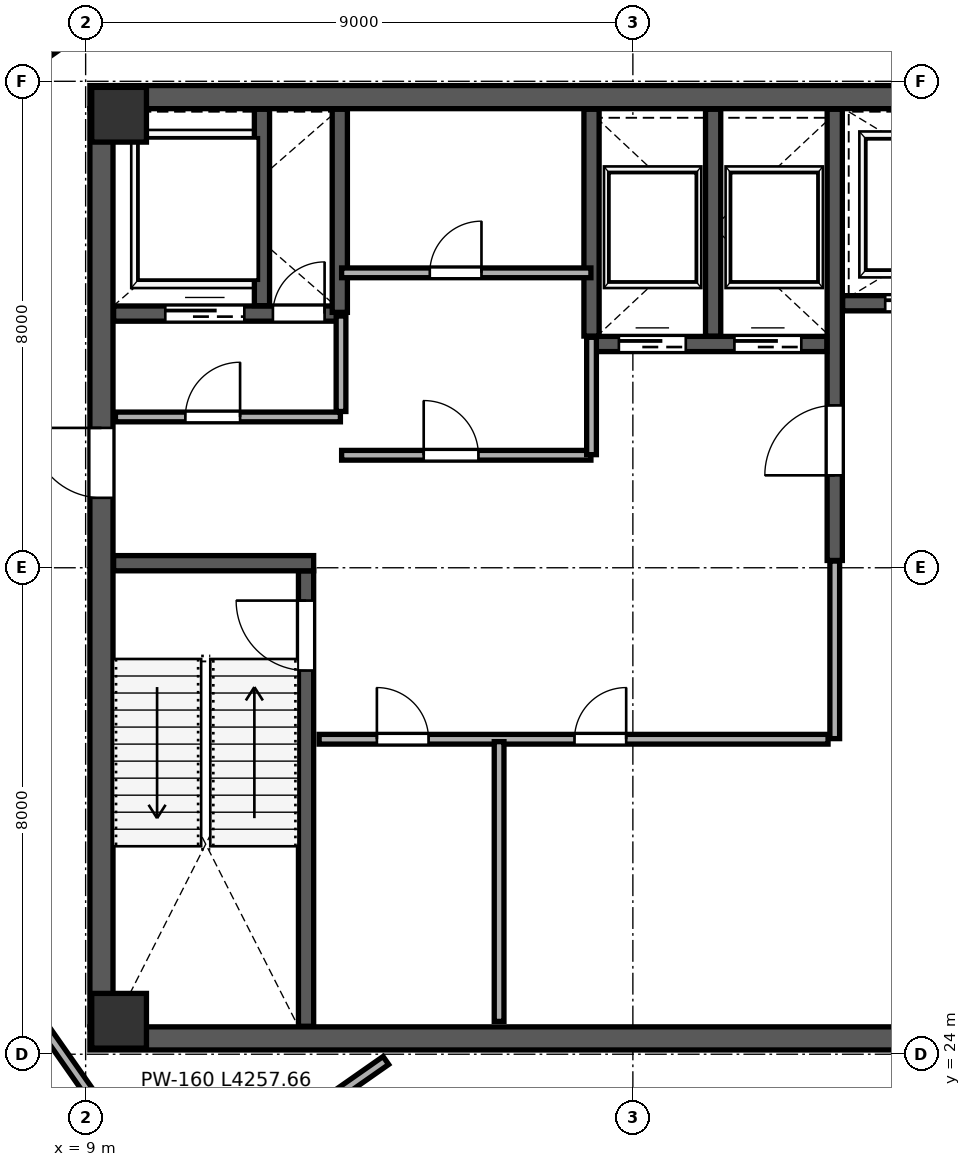
"""IFC4 building model, lengths in metres.
Left out: names, types, materials, properties, quantities, classifications, styles, units other than length and angle.
Written with IfcOpenShell. Run it as: python <this file> out.ifc"""

import sys

from ifc_helpers import new_model, si_unit, direction, frame, frame_2d, origin, origin_2d, place, context, subcontext, project, spatial, rectangle, extrude, source, transform, mapped, element, fill, save


model = new_model("IFC4")
c1 = context("Model", 3, precision=1e-05, world=origin(), true_north=direction((0.0, 1.0)))
c2 = subcontext(c1, "Body", "Model", "MODEL_VIEW")
j1 = project(units=[si_unit("LENGTHUNIT", "METRE"), si_unit("PLANEANGLEUNIT", "RADIAN")], contexts=[c1])
p1 = place(None, origin())
s1 = spatial("IfcSite", under=j1, at=p1, CompositionType="ELEMENT")
p2 = place(p1, origin())
s2 = spatial("IfcBuilding", under=s1, at=p2, CompositionType="ELEMENT")
p3 = place(p2, frame((0.0, 0.0, 303.0)))
s3 = spatial("IfcBuildingStorey", under=s2, at=p3, CompositionType="ELEMENT", Elevation=303.0)
m1 = source(origin(), c2, "Body", "SweptSolid", [
    extrude(rectangle(XDim=0.9, YDim=0.9, at=origin_2d()), origin(), (0.0, 0.0, 1.0), 4.198),
])
for number, where, z_axis, x_axis in (
    (1, (9.55, 24.55, 0.001), (0.0, 0.0, 1.0), (1.0, 0.0, 0.0)),
    (2, (9.55, 39.45, 0.001), (0.0, 0.0, 1.0), (1.0, 0.0, 0.0)),
):
    element("IfcColumn", number, at=place(p3, frame(where, z_axis=z_axis, x_axis=x_axis)), inside=s3, PredefinedType="COLUMN", context=c2, shape_type="MappedRepresentation", body=[
        mapped(m1, transform((0.0, 0.0, 0.0), scale=1.0)),
    ])
p4 = place(p3, frame((9.26, 24.45, 0.0), z_axis=(0.0, 0.0, 1.0), x_axis=(0.0, 1.0, 0.0)))
e3 = element("IfcWall", 3, at=p4, inside=s3, PredefinedType="SHEAR", context=c2, shape_type="SweptSolid", body=[
    extrude(rectangle(XDim=15.1, YDim=0.38, at=frame_2d((7.55, 0.0))), origin(), (0.0, 0.0, 1.0), 3.96),
])
p5 = place(p4, frame((8.7, 0.0, 0.0)))
e4 = element("IfcOpeningElement", 4, at=p5, cuts=e3, PredefinedType="OPENING", context=c2, shape_type="SweptSolid", body=[
    extrude(rectangle(XDim=1.15, YDim=2.2, at=frame_2d((0.575, 1.1))), frame((0.0, 0.2, 0.0), z_axis=(0.0, -1.0, 0.0), x_axis=(1.0, 0.0, 0.0)), (0.0, 0.0, 1.0), 0.4),
])
for number, where, z_axis, x_axis in (
    (5, (9.07, 24.26, 0.0), (0.0, 0.0, 1.0), (1.0, 0.0, 0.0)),
    (6, (9.07, 39.74, 0.0), (0.0, 0.0, 1.0), (1.0, 0.0, 0.0)),
):
    element("IfcWall", number, at=place(p3, frame(where, z_axis=z_axis, x_axis=x_axis)), inside=s3, PredefinedType="SHEAR", context=c2, shape_type="SweptSolid", body=[
        extrude(rectangle(XDim=17.86, YDim=0.38, at=frame_2d((8.93, 0.0))), origin(), (0.0, 0.0, 1.0), 3.96),
    ])
p6 = place(p3, frame((12.625, 24.46, 0.0), z_axis=(0.0, 0.0, 1.0), x_axis=(0.0, 1.0, 0.0)))
e7 = element("IfcWall", 7, at=p6, inside=s3, PredefinedType="SHEAR", context=c2, shape_type="SweptSolid", body=[
    extrude(rectangle(XDim=7.49, YDim=0.25, at=frame_2d((3.745, 0.0))), origin(), (0.0, 0.0, 1.0), 3.96),
])
p7 = place(p6, frame((5.85, 0.0, 0.0)))
e8 = element("IfcOpeningElement", 8, at=p7, cuts=e7, PredefinedType="OPENING", context=c2, shape_type="SweptSolid", body=[
    extrude(rectangle(XDim=1.15, YDim=2.2, at=frame_2d((0.575, 1.1))), frame((0.0, 0.135, 0.0), z_axis=(0.0, -1.0, 0.0), x_axis=(1.0, 0.0, 0.0)), (0.0, 0.0, 1.0), 0.27),
])
p8 = place(p3, frame((9.46, 32.075, 0.0), z_axis=(0.0, 0.0, 1.0), x_axis=(1.0, 0.0, 0.0)))
e9 = element("IfcWall", 9, at=p8, inside=s3, PredefinedType="SHEAR", context=c2, shape_type="SweptSolid", body=[
    extrude(rectangle(XDim=3.29, YDim=0.25, at=frame_2d((1.645, 0.0))), origin(), (0.0, 0.0, 1.0), 3.96),
])
p9 = place(p3, frame((21.32, 32.12, 0.0), z_axis=(0.0, 0.0, 1.0), x_axis=(0.0, 1.0, 0.0)))
e10 = element("IfcWall", 10, at=p9, inside=s3, PredefinedType="SHEAR", context=c2, shape_type="SweptSolid", body=[
    extrude(rectangle(XDim=7.42, YDim=0.25, at=frame_2d((3.71, 0.0))), origin(), (0.0, 0.0, 1.0), 3.96),
])
p10 = place(p9, frame((1.4, 0.0, 0.0)))
e11 = element("IfcOpeningElement", 11, at=p10, cuts=e10, PredefinedType="OPENING", context=c2, shape_type="SweptSolid", body=[
    extrude(rectangle(XDim=1.15, YDim=2.2, at=frame_2d((0.575, 1.1))), frame((0.0, 0.135, 0.0), z_axis=(0.0, -1.0, 0.0), x_axis=(1.0, 0.0, 0.0)), (0.0, 0.0, 1.0), 0.27),
])
p11 = place(p3, frame((9.46, 36.18, 0.0), z_axis=(0.0, 0.0, 1.0), x_axis=(1.0, 0.0, 0.0)))
e12 = element("IfcWall", 12, at=p11, inside=s3, PredefinedType="SHEAR", context=c2, shape_type="SweptSolid", body=[
    extrude(rectangle(XDim=3.79, YDim=0.25, at=frame_2d((1.895, 0.0))), origin(), (0.0, 0.0, 1.0), 3.96),
])
p12 = place(p11, frame((2.62, 0.0, 0.0)))
e13 = element("IfcOpeningElement", 13, at=p12, cuts=e12, PredefinedType="OPENING", context=c2, shape_type="SweptSolid", body=[
    extrude(rectangle(XDim=0.85, YDim=2.1, at=frame_2d((0.425, 1.05))), frame((0.0, 0.135, 0.0), z_axis=(0.0, -1.0, 0.0), x_axis=(1.0, 0.0, 0.0)), (0.0, 0.0, 1.0), 0.27),
])
p13 = place(p11, frame((0.85, 0.0, 0.0)))
e14 = element("IfcOpeningElement", 14, at=p13, cuts=e12, PredefinedType="OPENING", context=c2, shape_type="SweptSolid", body=[
    extrude(rectangle(XDim=1.3, YDim=2.25, at=frame_2d((0.65, 1.125))), frame((0.0, 0.135, 0.0), z_axis=(0.0, -1.0, 0.0), x_axis=(1.0, 0.0, 0.0)), (0.0, 0.0, 1.0), 0.27),
])
p14 = place(p3, frame((11.9, 36.31, 0.0), z_axis=(0.0, 0.0, 1.0), x_axis=(0.0, 1.0, 0.0)))
e15 = element("IfcWall", 15, at=p14, inside=s3, PredefinedType="SHEAR", context=c2, shape_type="SweptSolid", body=[
    extrude(rectangle(XDim=3.23, YDim=0.25, at=frame_2d((1.615, 0.0))), origin(), (0.0, 0.0, 1.0), 3.96),
])
p15 = place(p3, frame((21.45, 36.35, 0.0), z_axis=(0.0, 0.0, 1.0), x_axis=(1.0, 0.0, 0.0)))
e16 = element("IfcWall", 16, at=p15, inside=s3, PredefinedType="SHEAR", context=c2, shape_type="SweptSolid", body=[
    extrude(rectangle(XDim=5.09, YDim=0.25, at=frame_2d((2.545, 0.0))), origin(), (0.0, 0.0, 1.0), 3.96),
])
p16 = place(p15, frame((0.7, 0.0, 0.0)))
e17 = element("IfcOpeningElement", 17, at=p16, cuts=e16, PredefinedType="OPENING", context=c2, shape_type="SweptSolid", body=[
    extrude(rectangle(XDim=1.2, YDim=2.2, at=frame_2d((0.6, 1.1))), frame((0.0, 0.135, 0.0), z_axis=(0.0, -1.0, 0.0), x_axis=(1.0, 0.0, 0.0)), (0.0, 0.0, 1.0), 0.27),
])
p17 = place(p15, frame((3.25, 0.0, 0.0)))
e18 = element("IfcOpeningElement", 18, at=p17, cuts=e16, PredefinedType="OPENING", context=c2, shape_type="SweptSolid", body=[
    extrude(rectangle(XDim=1.2, YDim=2.2, at=frame_2d((0.6, 1.1))), frame((0.0, 0.135, 0.0), z_axis=(0.0, -1.0, 0.0), x_axis=(1.0, 0.0, 0.0)), (0.0, 0.0, 1.0), 0.27),
])
p18 = place(p3, frame((13.18, 36.2, 0.0), z_axis=(0.0, 0.0, 1.0), x_axis=(0.0, 1.0, 0.0)))
e19 = element("IfcWall", 19, at=p18, inside=s3, PredefinedType="SHEAR", context=c2, shape_type="SweptSolid", body=[
    extrude(rectangle(XDim=3.34, YDim=0.25, at=frame_2d((1.67, 0.0))), origin(), (0.0, 0.0, 1.0), 3.96),
])
p19 = place(p3, frame((17.32, 35.68, 0.0), z_axis=(0.0, 0.0, 1.0), x_axis=(1.0, 0.0, 0.0)))
e20 = element("IfcWall", 20, at=p19, inside=s3, PredefinedType="SHEAR", context=c2, shape_type="SweptSolid", body=[
    extrude(rectangle(XDim=3.87, YDim=0.25, at=frame_2d((1.935, 0.0))), origin(), (0.0, 0.0, 1.0), 3.96),
])
p20 = place(p19, frame((0.45, 0.0, 0.0)))
e21 = element("IfcOpeningElement", 21, at=p20, cuts=e20, PredefinedType="OPENING", context=c2, shape_type="SweptSolid", body=[
    extrude(rectangle(XDim=1.1, YDim=2.2, at=frame_2d((0.55, 1.1))), frame((0.0, 0.135, 0.0), z_axis=(0.0, -1.0, 0.0), x_axis=(1.0, 0.0, 0.0)), (0.0, 0.0, 1.0), 0.27),
])
p21 = place(p19, frame((2.35, 0.0, 0.0)))
e22 = element("IfcOpeningElement", 22, at=p21, cuts=e20, PredefinedType="OPENING", context=c2, shape_type="SweptSolid", body=[
    extrude(rectangle(XDim=1.1, YDim=2.2, at=frame_2d((0.55, 1.1))), frame((0.0, 0.135, 0.0), z_axis=(0.0, -1.0, 0.0), x_axis=(1.0, 0.0, 0.0)), (0.0, 0.0, 1.0), 0.27),
])
for number, where, z_axis, x_axis in (
    (23, (17.32, 35.81, 0.0), (0.0, 0.0, 1.0), (0.0, 1.0, 0.0)),
    (24, (19.32, 35.81, 0.0), (0.0, 0.0, 1.0), (0.0, 1.0, 0.0)),
):
    element("IfcWall", number, at=place(p3, frame(where, z_axis=z_axis, x_axis=x_axis)), inside=s3, PredefinedType="SHEAR", context=c2, shape_type="SweptSolid", body=[
        extrude(rectangle(XDim=3.73, YDim=0.25, at=frame_2d((1.865, 0.0))), origin(), (0.0, 0.0, 1.0), 3.96),
    ])
p22 = place(p3, frame((9.49, 34.48, 0.0), z_axis=(0.0, 0.0, 1.0), x_axis=(1.0, 0.0, 0.0)))
e25 = element("IfcWall", 25, at=p22, inside=s3, PredefinedType="PARTITIONING", context=c2, shape_type="SweptSolid", body=[
    extrude(rectangle(XDim=3.7, YDim=0.16, at=frame_2d((1.85, 0.0))), origin(), (0.0, 0.0, 1.0), 3.96),
])
p23 = place(p22, frame((1.15, 0.0, 0.0)))
e26 = element("IfcOpeningElement", 26, at=p23, cuts=e25, PredefinedType="OPENING", context=c2, shape_type="SweptSolid", body=[
    extrude(rectangle(XDim=0.9, YDim=2.15, at=frame_2d((0.45, 1.075))), frame((0.0, 0.09, 0.0), z_axis=(0.0, -1.0, 0.0), x_axis=(1.0, 0.0, 0.0)), (0.0, 0.0, 1.0), 0.18),
])
p24 = place(p3, frame((13.2, 34.57, 0.0), z_axis=(0.0, 0.0, 1.0), x_axis=(0.0, 1.0, 0.0)))
e27 = element("IfcWall", 27, at=p24, inside=s3, PredefinedType="PARTITIONING", context=c2, shape_type="SweptSolid", body=[
    extrude(rectangle(XDim=1.57, YDim=0.16, at=frame_2d((0.785, 0.0))), origin(), (0.0, 0.0, 1.0), 3.96),
])
p25 = place(p3, frame((13.21, 33.85, 0.0), z_axis=(0.0, 0.0, 1.0), x_axis=(1.0, 0.0, 0.0)))
e28 = element("IfcWall", 28, at=p25, inside=s3, PredefinedType="PARTITIONING", context=c2, shape_type="SweptSolid", body=[
    extrude(rectangle(XDim=4.1, YDim=0.16, at=frame_2d((2.05, 0.0))), origin(), (0.0, 0.0, 1.0), 3.96),
])
p26 = place(p25, frame((1.35, 0.0, 0.0)))
e29 = element("IfcOpeningElement", 29, at=p26, cuts=e28, PredefinedType="OPENING", context=c2, shape_type="SweptSolid", body=[
    extrude(rectangle(XDim=0.9, YDim=2.15, at=frame_2d((0.45, 1.075))), frame((0.0, 0.09, 0.0), z_axis=(0.0, -1.0, 0.0), x_axis=(1.0, 0.0, 0.0)), (0.0, 0.0, 1.0), 0.18),
])
p27 = place(p3, frame((17.32, 33.86, 0.0), z_axis=(0.0, 0.0, 1.0), x_axis=(0.0, 1.0, 0.0)))
e30 = element("IfcWall", 30, at=p27, inside=s3, PredefinedType="PARTITIONING", context=c2, shape_type="SweptSolid", body=[
    extrude(rectangle(XDim=1.93, YDim=0.16, at=frame_2d((0.965, 0.0))), origin(), (0.0, 0.0, 1.0), 3.96),
])
p28 = place(p3, frame((13.21, 36.85, 0.0), z_axis=(0.0, 0.0, 1.0), x_axis=(1.0, 0.0, 0.0)))
e31 = element("IfcWall", 31, at=p28, inside=s3, PredefinedType="PARTITIONING", context=c2, shape_type="SweptSolid", body=[
    extrude(rectangle(XDim=4.1, YDim=0.16, at=frame_2d((2.05, 0.0))), origin(), (0.0, 0.0, 1.0), 3.96),
])
p29 = place(p28, frame((1.45, 0.0, 0.0)))
e32 = element("IfcOpeningElement", 32, at=p29, cuts=e31, PredefinedType="OPENING", context=c2, shape_type="SweptSolid", body=[
    extrude(rectangle(XDim=0.85, YDim=2.1, at=frame_2d((0.425, 1.05))), frame((0.0, 0.09, 0.0), z_axis=(0.0, -1.0, 0.0), x_axis=(1.0, 0.0, 0.0)), (0.0, 0.0, 1.0), 0.18),
])
p30 = place(p3, frame((12.84, 29.18, 0.0), z_axis=(0.0, 0.0, 1.0), x_axis=(1.0, 0.0, 0.0)))
e33 = element("IfcWall", 33, at=p30, inside=s3, PredefinedType="PARTITIONING", context=c2, shape_type="SweptSolid", body=[
    extrude(rectangle(XDim=8.37, YDim=0.16, at=frame_2d((4.185, 0.0))), origin(), (0.0, 0.0, 1.0), 3.96),
])
p31 = place(p30, frame((0.95, 0.0, 0.0)))
e34 = element("IfcOpeningElement", 34, at=p31, cuts=e33, PredefinedType="OPENING", context=c2, shape_type="SweptSolid", body=[
    extrude(rectangle(XDim=0.85, YDim=2.1, at=frame_2d((0.425, 1.05))), frame((0.0, 0.09, 0.0), z_axis=(0.0, -1.0, 0.0), x_axis=(1.0, 0.0, 0.0)), (0.0, 0.0, 1.0), 0.18),
])
p32 = place(p30, frame((4.2, 0.0, 0.0)))
e35 = element("IfcOpeningElement", 35, at=p32, cuts=e33, PredefinedType="OPENING", context=c2, shape_type="SweptSolid", body=[
    extrude(rectangle(XDim=0.85, YDim=2.1, at=frame_2d((0.425, 1.05))), frame((0.0, 0.09, 0.0), z_axis=(0.0, -1.0, 0.0), x_axis=(1.0, 0.0, 0.0)), (0.0, 0.0, 1.0), 0.18),
])
p33 = place(p3, frame((15.8, 24.54, 0.0), z_axis=(0.0, 0.0, 1.0), x_axis=(0.0, 1.0, 0.0)))
e36 = element("IfcWall", 36, at=p33, inside=s3, PredefinedType="PARTITIONING", context=c2, shape_type="SweptSolid", body=[
    extrude(rectangle(XDim=4.6, YDim=0.16, at=frame_2d((2.3, 0.0))), origin(), (0.0, 0.0, 1.0), 3.96),
])
p34 = place(p3, frame((21.32, 29.19, 0.0), z_axis=(0.0, 0.0, 1.0), x_axis=(0.0, 1.0, 0.0)))
e37 = element("IfcWall", 37, at=p34, inside=s3, PredefinedType="PARTITIONING", context=c2, shape_type="SweptSolid", body=[
    extrude(rectangle(XDim=2.92, YDim=0.16, at=frame_2d((1.46, 0.0))), origin(), (0.0, 0.0, 1.0), 3.96),
])
p35 = place(p3, frame((3.758, 30.942, 0.0), z_axis=(0.0, 0.0, 1.0), x_axis=(0.573575634469, -0.819152605772, 0.0)))
e38 = element("IfcWall", 38, at=p35, inside=s3, PredefinedType="PARTITIONING", context=c2, shape_type="SweptSolid", body=[
    extrude(rectangle(XDim=11.57, YDim=0.16, at=frame_2d((5.785, 0.0))), origin(), (0.0, 0.0, 1.0), 3.96),
])
p36 = place(p35, frame((1.15, 0.0, 0.0)))
e39 = element("IfcOpeningElement", 39, at=p36, cuts=e38, PredefinedType="OPENING", context=c2, shape_type="SweptSolid", body=[
    extrude(rectangle(XDim=0.95, YDim=2.15, at=frame_2d((0.475, 1.075))), frame((0.0, 0.09, 0.0), z_axis=(0.0, -1.0, 0.0), x_axis=(1.0, 0.0, 0.0)), (0.0, 0.0, 1.0), 0.18),
])
p37 = place(p3, frame((10.45, 21.455, 0.0), z_axis=(0.0, 0.0, 1.0), x_axis=(0.819110678768, 0.573635507903, 0.0)))
e40 = element("IfcWall", 40, at=p37, inside=s3, PredefinedType="PARTITIONING", context=c2, shape_type="SweptSolid", body=[
    extrude(rectangle(XDim=4.258, YDim=0.16, at=frame_2d((2.129, 0.0))), origin(), (0.0, 0.0, 1.0), 3.96),
])
p38 = place(p3, frame((21.918, 49.884, 0.0), z_axis=(0.0, 0.0, 1.0), x_axis=(0.57358495776, -0.819146077468, 0.0)))
e41 = element("IfcWall", 41, at=p38, inside=s3, PredefinedType="PARTITIONING", context=c2, shape_type="SweptSolid", body=[
    extrude(rectangle(XDim=25.79, YDim=0.1, at=frame_2d((12.895, 0.0))), origin(), (0.0, 0.0, 1.0), 3.96),
])
p39 = place(p38, frame((9.2, 0.0, 0.0)))
e42 = element("IfcOpeningElement", 42, at=p39, cuts=e41, PredefinedType="OPENING", context=c2, shape_type="SweptSolid", body=[
    extrude(rectangle(XDim=0.95, YDim=2.15, at=frame_2d((0.475, 1.075))), frame((0.0, 0.06, 0.0), z_axis=(0.0, -1.0, 0.0), x_axis=(1.0, 0.0, 0.0)), (0.0, 0.0, 1.0), 0.12),
])
p40 = place(p3, frame((2.071, 36.036, 0.0), z_axis=(0.0, 0.0, 1.0), x_axis=(0.819154854942, 0.573572422302, 0.0)))
e43 = element("IfcWall", 43, at=p40, inside=s3, PredefinedType="PARTITIONING", context=c2, shape_type="SweptSolid", body=[
    extrude(rectangle(XDim=29.62, YDim=0.115, at=frame_2d((14.81, 0.0))), origin(), (0.0, 0.0, 1.0), 3.96),
])
p41 = place(p40, frame((4.2, 0.0, 0.0)))
e44 = element("IfcOpeningElement", 44, at=p41, cuts=e43, PredefinedType="OPENING", context=c2, shape_type="SweptSolid", body=[
    extrude(rectangle(XDim=0.95, YDim=2.15, at=frame_2d((0.475, 1.075))), frame((0.0, 0.067, 0.0), z_axis=(0.0, -1.0, 0.0), x_axis=(1.0, 0.0, 0.0)), (0.0, 0.0, 1.0), 0.135),
])
m2 = source(origin(), c2, "Body", "SweptSolid", [
    extrude(rectangle(XDim=1.15, YDim=2.2, at=frame_2d((0.575, 1.1))), frame((0.0, 0.025, 0.0), z_axis=(0.0, -1.0, 0.0), x_axis=(1.0, 0.0, 0.0)), (0.0, 0.0, 1.0), 0.05),
])
p42 = place(p7, origin())
e45 = element("IfcDoor", 45, at=p42, inside=s3, OperationType="SINGLE_SWING_RIGHT", PredefinedType="DOOR", context=c2, shape_type="MappedRepresentation", body=[
    mapped(m2, transform((0.0, 0.0, 0.0), scale=1.0)),
])
fill(e8, e45)
m3 = source(origin(), c2, "Body", "SweptSolid", [
    extrude(rectangle(XDim=1.15, YDim=2.2, at=frame_2d((0.575, 1.1))), frame((0.0, 0.025, 0.0), z_axis=(0.0, -1.0, 0.0), x_axis=(1.0, 0.0, 0.0)), (0.0, 0.0, 1.0), 0.05),
])
p43 = place(p10, origin())
e46 = element("IfcDoor", 46, at=p43, inside=s3, OperationType="SINGLE_SWING_LEFT", PredefinedType="DOOR", context=c2, shape_type="MappedRepresentation", body=[
    mapped(m3, transform((0.0, 0.0, 0.0), scale=1.0)),
])
fill(e11, e46)
p44 = place(p5, origin())
e47 = element("IfcDoor", 47, at=p44, inside=s3, OperationType="SINGLE_SWING_RIGHT", PredefinedType="DOOR", context=c2, shape_type="MappedRepresentation", body=[
    mapped(m3, transform((0.0, 0.0, 0.0), scale=1.0)),
])
fill(e4, e47)
m4 = source(origin(), c2, "Body", "SweptSolid", [
    extrude(rectangle(XDim=0.85, YDim=2.1, at=frame_2d((0.425, 1.05))), frame((0.0, 0.025, 0.0), z_axis=(0.0, -1.0, 0.0), x_axis=(1.0, 0.0, 0.0)), (0.0, 0.0, 1.0), 0.05),
])
p45 = place(p12, origin())
e48 = element("IfcDoor", 48, at=p45, inside=s3, OperationType="SINGLE_SWING_RIGHT", PredefinedType="DOOR", context=c2, shape_type="MappedRepresentation", body=[
    mapped(m4, transform((0.0, 0.0, 0.0), scale=1.0)),
])
fill(e13, e48)
m5 = source(origin(), c2, "Body", "SweptSolid", [
    extrude(rectangle(XDim=1.1, YDim=2.2, at=frame_2d((0.55, 1.1))), frame((0.0, 0.025, 0.0), z_axis=(0.0, -1.0, 0.0), x_axis=(1.0, 0.0, 0.0)), (0.0, 0.0, 1.0), 0.05),
])
p46 = place(p20, origin())
e49 = element("IfcDoor", 49, at=p46, inside=s3, OperationType="SLIDING_TO_LEFT", PredefinedType="DOOR", context=c2, shape_type="MappedRepresentation", body=[
    mapped(m5, transform((0.0, 0.0, 0.0), scale=1.0)),
])
fill(e21, e49)
p47 = place(p21, origin())
e50 = element("IfcDoor", 50, at=p47, inside=s3, OperationType="SLIDING_TO_RIGHT", PredefinedType="DOOR", context=c2, shape_type="MappedRepresentation", body=[
    mapped(m5, transform((0.0, 0.0, 0.0), scale=1.0)),
])
fill(e22, e50)
m6 = source(origin(), c2, "Body", "SweptSolid", [
    extrude(rectangle(XDim=1.2, YDim=2.2, at=frame_2d((0.6, 1.1))), frame((0.0, 0.025, 0.0), z_axis=(0.0, -1.0, 0.0), x_axis=(1.0, 0.0, 0.0)), (0.0, 0.0, 1.0), 0.05),
])
p48 = place(p16, origin())
e51 = element("IfcDoor", 51, at=p48, inside=s3, OperationType="SLIDING_TO_LEFT", PredefinedType="DOOR", context=c2, shape_type="MappedRepresentation", body=[
    mapped(m6, transform((0.0, 0.0, 0.0), scale=1.0)),
])
fill(e17, e51)
m7 = source(origin(), c2, "Body", "SweptSolid", [
    extrude(rectangle(XDim=1.3, YDim=2.25, at=frame_2d((0.65, 1.125))), frame((0.0, 0.025, 0.0), z_axis=(0.0, -1.0, 0.0), x_axis=(1.0, 0.0, 0.0)), (0.0, 0.0, 1.0), 0.05),
])
p49 = place(p13, origin())
e52 = element("IfcDoor", 52, at=p49, inside=s3, OperationType="SLIDING_TO_LEFT", PredefinedType="DOOR", context=c2, shape_type="MappedRepresentation", body=[
    mapped(m7, transform((0.0, 0.0, 0.0), scale=1.0)),
])
fill(e14, e52)
m8 = source(origin(), c2, "Body", "SweptSolid", [
    extrude(rectangle(XDim=0.9, YDim=2.15, at=frame_2d((0.45, 1.075))), frame((0.0, 0.025, 0.0), z_axis=(0.0, -1.0, 0.0), x_axis=(1.0, 0.0, 0.0)), (0.0, 0.0, 1.0), 0.05),
])
p50 = place(p23, origin())
e53 = element("IfcDoor", 53, at=p50, inside=s3, OperationType="SINGLE_SWING_RIGHT", PredefinedType="DOOR", context=c2, shape_type="MappedRepresentation", body=[
    mapped(m8, transform((0.0, 0.0, 0.0), scale=1.0)),
])
fill(e26, e53)
p51 = place(p26, origin())
e54 = element("IfcDoor", 54, at=p51, inside=s3, OperationType="SINGLE_SWING_LEFT", PredefinedType="DOOR", context=c2, shape_type="MappedRepresentation", body=[
    mapped(m8, transform((0.0, 0.0, 0.0), scale=1.0)),
])
fill(e29, e54)
p52 = place(p29, origin())
e55 = element("IfcDoor", 55, at=p52, inside=s3, OperationType="SINGLE_SWING_RIGHT", PredefinedType="DOOR", context=c2, shape_type="MappedRepresentation", body=[
    mapped(m4, transform((0.0, 0.0, 0.0), scale=1.0)),
])
fill(e32, e55)
p53 = place(p31, origin())
e56 = element("IfcDoor", 56, at=p53, inside=s3, OperationType="SINGLE_SWING_LEFT", PredefinedType="DOOR", context=c2, shape_type="MappedRepresentation", body=[
    mapped(m4, transform((0.0, 0.0, 0.0), scale=1.0)),
])
fill(e34, e56)
p54 = place(p32, origin())
e57 = element("IfcDoor", 57, at=p54, inside=s3, OperationType="SINGLE_SWING_RIGHT", PredefinedType="DOOR", context=c2, shape_type="MappedRepresentation", body=[
    mapped(m4, transform((0.0, 0.0, 0.0), scale=1.0)),
])
fill(e35, e57)
save(model, sys.argv[1])
